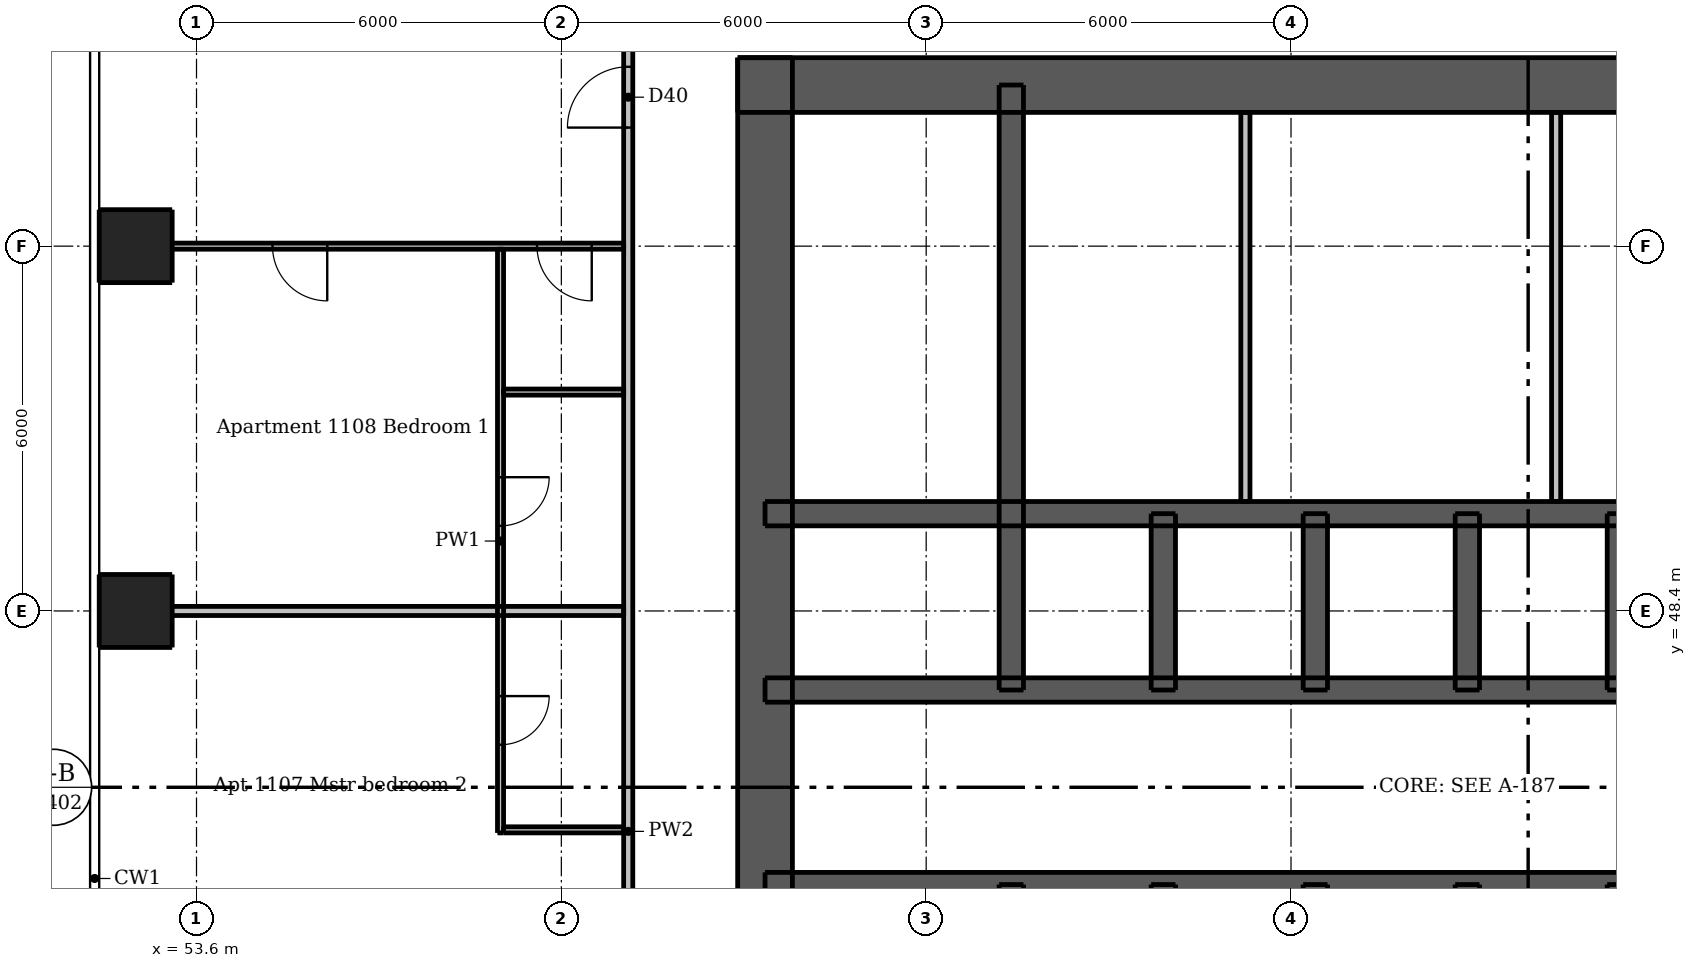
"""IFC4 building model, lengths in metres.
Left out: names, types, materials, properties, quantities, classifications, styles, units other than length and angle.
Written with IfcOpenShell. Run it as: python <this file> out.ifc"""

import sys

from ifc_helpers import new_model, si_unit, direction, frame, frame_2d, origin, origin_2d, place, context, subcontext, project, spatial, rectangle, extrude, element, fill, save


model = new_model("IFC4")
c1 = context("Model", 3, precision=1e-05, world=origin(), true_north=direction((0.0, 1.0)))
c2 = subcontext(c1, "Body", "Model", "MODEL_VIEW")
j1 = project(units=[si_unit("LENGTHUNIT", "METRE"), si_unit("PLANEANGLEUNIT", "RADIAN")], contexts=[c1])
p1 = place(None, origin())
s1 = spatial("IfcSite", under=j1, at=p1, CompositionType="ELEMENT")
p2 = place(p1, origin())
s2 = spatial("IfcBuilding", under=s1, at=p2, CompositionType="ELEMENT")
p3 = place(p2, frame((0.0, 0.0, 43.3)))
s3 = spatial("IfcBuildingStorey", under=s2, at=p3, CompositionType="ELEMENT", Elevation=43.3)
p4 = place(p3, frame((62.5, 57.05, 0.0), z_axis=(0.0, 0.0, 1.0), x_axis=(1.0, 0.0, 0.0)))
e1 = element("IfcWall", 1, at=p4, inside=s3, PredefinedType="SHEAR", context=c2, shape_type="SweptSolid", body=[
    extrude(rectangle(XDim=24.0, YDim=0.9, at=frame_2d((12.0, 0.0))), origin(), (0.0, 0.0, 1.0), 3.05),
])
p5 = place(p4, frame((20.85, 0.0, 0.0)))
e2 = element("IfcOpeningElement", 2, at=p5, cuts=e1, PredefinedType="OPENING", context=c2, shape_type="SweptSolid", body=[
    extrude(rectangle(XDim=1.1, YDim=2.1, at=frame_2d((0.55, 1.05))), frame((0.0, 0.46, 0.0), z_axis=(0.0, -1.0, 0.0), x_axis=(1.0, 0.0, 0.0)), (0.0, 0.0, 1.0), 0.92),
])
p6 = place(p4, frame((2.05, 0.0, 0.0)))
e3 = element("IfcOpeningElement", 3, at=p6, cuts=e1, PredefinedType="OPENING", context=c2, shape_type="SweptSolid", body=[
    extrude(rectangle(XDim=1.1, YDim=2.1, at=frame_2d((0.55, 1.05))), frame((0.0, 0.46, 0.0), z_axis=(0.0, -1.0, 0.0), x_axis=(1.0, 0.0, 0.0)), (0.0, 0.0, 1.0), 0.92),
])
p7 = place(p4, frame((6.075, 0.0, 0.0)))
e4 = element("IfcOpeningElement", 4, at=p7, cuts=e1, PredefinedType="OPENING", context=c2, shape_type="SweptSolid", body=[
    extrude(rectangle(XDim=0.9, YDim=2.1, at=frame_2d((0.45, 1.05))), frame((0.0, 0.46, 0.0), z_axis=(0.0, -1.0, 0.0), x_axis=(1.0, 0.0, 0.0)), (0.0, 0.0, 1.0), 0.92),
])
p8 = place(p4, frame((10.455, 0.0, 0.0)))
e5 = element("IfcOpeningElement", 5, at=p8, cuts=e1, PredefinedType="OPENING", context=c2, shape_type="SweptSolid", body=[
    extrude(rectangle(XDim=0.9, YDim=2.1, at=frame_2d((0.45, 1.05))), frame((0.0, 0.46, 0.0), z_axis=(0.0, -1.0, 0.0), x_axis=(1.0, 0.0, 0.0)), (0.0, 0.0, 1.0), 0.92),
])
p9 = place(p4, frame((15.93, 0.0, 0.0)))
e6 = element("IfcOpeningElement", 6, at=p9, cuts=e1, PredefinedType="OPENING", context=c2, shape_type="SweptSolid", body=[
    extrude(rectangle(XDim=0.9, YDim=2.1, at=frame_2d((0.45, 1.05))), frame((0.0, 0.46, 0.0), z_axis=(0.0, -1.0, 0.0), x_axis=(1.0, 0.0, 0.0)), (0.0, 0.0, 1.0), 0.92),
])
p10 = place(p3, frame((62.95, 33.5, 0.0), z_axis=(0.0, 0.0, 1.0), x_axis=(0.0, 1.0, 0.0)))
e7 = element("IfcWall", 7, at=p10, inside=s3, PredefinedType="SHEAR", context=c2, shape_type="SweptSolid", body=[
    extrude(rectangle(XDim=24.0, YDim=0.9, at=frame_2d((12.0, 0.0))), origin(), (0.0, 0.0, 1.0), 3.05),
])
p11 = place(p10, frame((11.2, 0.0, 0.0)))
e8 = element("IfcOpeningElement", 8, at=p11, cuts=e7, PredefinedType="OPENING", context=c2, shape_type="SweptSolid", body=[
    extrude(rectangle(XDim=1.6, YDim=2.1, at=frame_2d((0.8, 1.05))), frame((0.0, 0.46, 0.0), z_axis=(0.0, -1.0, 0.0), x_axis=(1.0, 0.0, 0.0)), (0.0, 0.0, 1.0), 0.92),
])
p12 = place(p3, frame((62.95, 43.9, 0.0), z_axis=(0.0, 0.0, 1.0), x_axis=(1.0, 0.0, 0.0)))
e9 = element("IfcWall", 9, at=p12, inside=s3, PredefinedType="SHEAR", context=c2, shape_type="SweptSolid", body=[
    extrude(rectangle(XDim=23.1, YDim=0.4, at=frame_2d((11.55, 0.0))), origin(), (0.0, 0.0, 1.0), 3.05),
])
p13 = place(p12, frame((1.088, 0.0, 0.0)))
e10 = element("IfcOpeningElement", 10, at=p13, cuts=e9, PredefinedType="OPENING", context=c2, shape_type="SweptSolid", body=[
    extrude(rectangle(XDim=0.9, YDim=2.1, at=frame_2d((0.45, 1.05))), frame((0.0, 0.21, 0.0), z_axis=(0.0, -1.0, 0.0), x_axis=(1.0, 0.0, 0.0)), (0.0, 0.0, 1.0), 0.42),
])
p14 = place(p12, frame((2.838, 0.0, 0.0)))
e11 = element("IfcOpeningElement", 11, at=p14, cuts=e9, PredefinedType="OPENING", context=c2, shape_type="SweptSolid", body=[
    extrude(rectangle(XDim=0.8, YDim=2.1, at=frame_2d((0.4, 1.05))), frame((0.0, 0.21, 0.0), z_axis=(0.0, -1.0, 0.0), x_axis=(1.0, 0.0, 0.0)), (0.0, 0.0, 1.0), 0.42),
])
p15 = place(p12, frame((20.5, 0.0, 0.0)))
e12 = element("IfcOpeningElement", 12, at=p15, cuts=e9, PredefinedType="OPENING", context=c2, shape_type="SweptSolid", body=[
    extrude(rectangle(XDim=0.9, YDim=2.1, at=frame_2d((0.45, 1.05))), frame((0.0, 0.21, 0.0), z_axis=(0.0, -1.0, 0.0), x_axis=(1.0, 0.0, 0.0)), (0.0, 0.0, 1.0), 0.42),
])
p16 = place(p12, frame((4.75, 0.0, 0.0)))
e13 = element("IfcOpeningElement", 13, at=p16, cuts=e9, PredefinedType="OPENING", context=c2, shape_type="SweptSolid", body=[
    extrude(rectangle(XDim=1.1, YDim=2.1, at=frame_2d((0.55, 1.05))), frame((0.0, 0.21, 0.0), z_axis=(0.0, -1.0, 0.0), x_axis=(1.0, 0.0, 0.0)), (0.0, 0.0, 1.0), 0.42),
])
p17 = place(p12, frame((7.25, 0.0, 0.0)))
e14 = element("IfcOpeningElement", 14, at=p17, cuts=e9, PredefinedType="OPENING", context=c2, shape_type="SweptSolid", body=[
    extrude(rectangle(XDim=1.1, YDim=2.1, at=frame_2d((0.55, 1.05))), frame((0.0, 0.21, 0.0), z_axis=(0.0, -1.0, 0.0), x_axis=(1.0, 0.0, 0.0)), (0.0, 0.0, 1.0), 0.42),
])
p18 = place(p12, frame((9.75, 0.0, 0.0)))
e15 = element("IfcOpeningElement", 15, at=p18, cuts=e9, PredefinedType="OPENING", context=c2, shape_type="SweptSolid", body=[
    extrude(rectangle(XDim=1.1, YDim=2.1, at=frame_2d((0.55, 1.05))), frame((0.0, 0.21, 0.0), z_axis=(0.0, -1.0, 0.0), x_axis=(1.0, 0.0, 0.0)), (0.0, 0.0, 1.0), 0.42),
])
p19 = place(p12, frame((12.25, 0.0, 0.0)))
e16 = element("IfcOpeningElement", 16, at=p19, cuts=e9, PredefinedType="OPENING", context=c2, shape_type="SweptSolid", body=[
    extrude(rectangle(XDim=1.1, YDim=2.1, at=frame_2d((0.55, 1.05))), frame((0.0, 0.21, 0.0), z_axis=(0.0, -1.0, 0.0), x_axis=(1.0, 0.0, 0.0)), (0.0, 0.0, 1.0), 0.42),
])
p20 = place(p12, frame((14.75, 0.0, 0.0)))
e17 = element("IfcOpeningElement", 17, at=p20, cuts=e9, PredefinedType="OPENING", context=c2, shape_type="SweptSolid", body=[
    extrude(rectangle(XDim=1.1, YDim=2.1, at=frame_2d((0.55, 1.05))), frame((0.0, 0.21, 0.0), z_axis=(0.0, -1.0, 0.0), x_axis=(1.0, 0.0, 0.0)), (0.0, 0.0, 1.0), 0.42),
])
p21 = place(p12, frame((17.25, 0.0, 0.0)))
e18 = element("IfcOpeningElement", 18, at=p21, cuts=e9, PredefinedType="OPENING", context=c2, shape_type="SweptSolid", body=[
    extrude(rectangle(XDim=1.1, YDim=2.1, at=frame_2d((0.55, 1.05))), frame((0.0, 0.21, 0.0), z_axis=(0.0, -1.0, 0.0), x_axis=(1.0, 0.0, 0.0)), (0.0, 0.0, 1.0), 0.42),
])
p22 = place(p3, frame((62.95, 47.1, 0.0), z_axis=(0.0, 0.0, 1.0), x_axis=(1.0, 0.0, 0.0)))
e19 = element("IfcWall", 19, at=p22, inside=s3, PredefinedType="SHEAR", context=c2, shape_type="SweptSolid", body=[
    extrude(rectangle(XDim=23.1, YDim=0.4, at=frame_2d((11.55, 0.0))), origin(), (0.0, 0.0, 1.0), 3.05),
])
p23 = place(p22, frame((1.7, 0.0, 0.0)))
e20 = element("IfcOpeningElement", 20, at=p23, cuts=e19, PredefinedType="OPENING", context=c2, shape_type="SweptSolid", body=[
    extrude(rectangle(XDim=0.9, YDim=2.1, at=frame_2d((0.45, 1.05))), frame((0.0, 0.21, 0.0), z_axis=(0.0, -1.0, 0.0), x_axis=(1.0, 0.0, 0.0)), (0.0, 0.0, 1.0), 0.42),
])
p24 = place(p22, frame((20.5, 0.0, 0.0)))
e21 = element("IfcOpeningElement", 21, at=p24, cuts=e19, PredefinedType="OPENING", context=c2, shape_type="SweptSolid", body=[
    extrude(rectangle(XDim=0.9, YDim=2.1, at=frame_2d((0.45, 1.05))), frame((0.0, 0.21, 0.0), z_axis=(0.0, -1.0, 0.0), x_axis=(1.0, 0.0, 0.0)), (0.0, 0.0, 1.0), 0.42),
])
p25 = place(p3, frame((62.95, 50.0, 0.0), z_axis=(0.0, 0.0, 1.0), x_axis=(1.0, 0.0, 0.0)))
e22 = element("IfcWall", 22, at=p25, inside=s3, PredefinedType="SHEAR", context=c2, shape_type="SweptSolid", body=[
    extrude(rectangle(XDim=23.1, YDim=0.4, at=frame_2d((11.55, 0.0))), origin(), (0.0, 0.0, 1.0), 3.05),
])
p26 = place(p3, frame((67.0, 33.95, 0.0), z_axis=(0.0, 0.0, 1.0), x_axis=(0.0, 1.0, 0.0)))
e23 = element("IfcWall", 23, at=p26, inside=s3, PredefinedType="SHEAR", context=c2, shape_type="SweptSolid", body=[
    extrude(rectangle(XDim=9.95, YDim=0.4, at=frame_2d((4.975, 0.0))), origin(), (0.0, 0.0, 1.0), 3.05),
])
p27 = place(p26, frame((0.65, 0.0, 0.0)))
e24 = element("IfcOpeningElement", 24, at=p27, cuts=e23, PredefinedType="OPENING", context=c2, shape_type="SweptSolid", body=[
    extrude(rectangle(XDim=1.1, YDim=2.1, at=frame_2d((0.55, 1.05))), frame((0.0, 0.21, 0.0), z_axis=(0.0, -1.0, 0.0), x_axis=(1.0, 0.0, 0.0)), (0.0, 0.0, 1.0), 0.42),
])
p28 = place(p3, frame((67.0, 47.1, 0.0), z_axis=(0.0, 0.0, 1.0), x_axis=(0.0, 1.0, 0.0)))
e25 = element("IfcWall", 25, at=p28, inside=s3, PredefinedType="SHEAR", context=c2, shape_type="SweptSolid", body=[
    extrude(rectangle(XDim=9.95, YDim=0.4, at=frame_2d((4.975, 0.0))), origin(), (0.0, 0.0, 1.0), 3.05),
])
for number, where, z_axis, x_axis in (
    (26, (69.5, 41.0, 0.0), (0.0, 0.0, 1.0), (0.0, 1.0, 0.0)),
    (27, (69.5, 47.1, 0.0), (0.0, 0.0, 1.0), (0.0, 1.0, 0.0)),
    (28, (72.0, 41.0, 0.0), (0.0, 0.0, 1.0), (0.0, 1.0, 0.0)),
    (29, (72.0, 47.1, 0.0), (0.0, 0.0, 1.0), (0.0, 1.0, 0.0)),
    (30, (74.5, 41.0, 0.0), (0.0, 0.0, 1.0), (0.0, 1.0, 0.0)),
    (31, (74.5, 47.1, 0.0), (0.0, 0.0, 1.0), (0.0, 1.0, 0.0)),
    (32, (77.0, 41.0, 0.0), (0.0, 0.0, 1.0), (0.0, 1.0, 0.0)),
    (33, (77.0, 47.1, 0.0), (0.0, 0.0, 1.0), (0.0, 1.0, 0.0)),
):
    element("IfcWall", number, at=place(p3, frame(where, z_axis=z_axis, x_axis=x_axis)), inside=s3, PredefinedType="SHEAR", context=c2, shape_type="SweptSolid", body=[
        extrude(rectangle(XDim=2.9, YDim=0.4, at=frame_2d((1.45, 0.0))), origin(), (0.0, 0.0, 1.0), 3.05),
    ])
for number, where, z_axis, x_axis in (
    (34, (52.6, 48.4, 0.0), (0.0, 0.0, 1.0), (1.0, 0.0, 0.0)),
    (35, (52.6, 54.4, 0.0), (0.0, 0.0, 1.0), (1.0, 0.0, 0.0)),
):
    element("IfcColumn", number, at=place(p3, frame(where, z_axis=z_axis, x_axis=x_axis)), inside=s3, PredefinedType="COLUMN", context=c2, shape_type="SweptSolid", body=[
        extrude(rectangle(XDim=1.2, YDim=1.2, at=origin_2d()), origin(), (0.0, 0.0, 1.0), 3.05),
    ])
for number, where, z_axis, x_axis in (
    (36, (70.85, 50.2, 0.0), (0.0, 0.0, 1.0), (0.0, 1.0, 0.0)),
    (37, (75.96, 50.2, 0.0), (0.0, 0.0, 1.0), (0.0, 1.0, 0.0)),
):
    element("IfcWall", number, at=place(p3, frame(where, z_axis=z_axis, x_axis=x_axis)), inside=s3, PredefinedType="PLUMBINGWALL", context=c2, shape_type="SweptSolid", body=[
        extrude(rectangle(XDim=6.4, YDim=0.15, at=frame_2d((3.2, 0.0))), origin(), (0.0, 0.0, 1.0), 3.05),
    ])
p29 = place(p3, frame((58.6, 54.35, 0.0), z_axis=(0.0, 0.0, 1.0), x_axis=(0.0, -1.0, 0.0)))
e38 = element("IfcWall", 38, at=p29, inside=s3, PredefinedType="PARTITIONING", context=c2, shape_type="SweptSolid", body=[
    extrude(rectangle(XDim=9.6, YDim=0.1, at=frame_2d((4.8, 0.0))), origin(), (0.0, 0.0, 1.0), 3.05),
])
p30 = place(p29, frame((7.35, 0.0, 0.0)))
e39 = element("IfcOpeningElement", 39, at=p30, cuts=e38, PredefinedType="OPENING", context=c2, shape_type="SweptSolid", body=[
    extrude(rectangle(XDim=0.8, YDim=2.1, at=frame_2d((0.4, 1.05))), frame((0.0, 0.06, 0.0), z_axis=(0.0, -1.0, 0.0), x_axis=(1.0, 0.0, 0.0)), (0.0, 0.0, 1.0), 0.12),
])
p31 = place(p29, frame((3.75, 0.0, 0.0)))
e40 = element("IfcOpeningElement", 40, at=p31, cuts=e38, PredefinedType="OPENING", context=c2, shape_type="SweptSolid", body=[
    extrude(rectangle(XDim=0.8, YDim=2.1, at=frame_2d((0.4, 1.05))), frame((0.0, 0.06, 0.0), z_axis=(0.0, -1.0, 0.0), x_axis=(1.0, 0.0, 0.0)), (0.0, 0.0, 1.0), 0.12),
])
p32 = place(p3, frame((60.625, 54.4, 0.0), z_axis=(0.0, 0.0, 1.0), x_axis=(-1.0, 0.0, 0.0)))
e41 = element("IfcWall", 41, at=p32, inside=s3, PredefinedType="PARTITIONING", context=c2, shape_type="SweptSolid", body=[
    extrude(rectangle(XDim=8.625, YDim=0.1, at=frame_2d((4.312, 0.0))), origin(), (0.0, 0.0, 1.0), 2.516),
])
p33 = place(p32, frame((0.525, 0.0, 0.0)))
e42 = element("IfcOpeningElement", 42, at=p33, cuts=e41, PredefinedType="OPENING", context=c2, shape_type="SweptSolid", body=[
    extrude(rectangle(XDim=0.9, YDim=2.1, at=frame_2d((0.45, 1.05))), frame((0.0, 0.06, 0.0), z_axis=(0.0, -1.0, 0.0), x_axis=(1.0, 0.0, 0.0)), (0.0, 0.0, 1.0), 0.12),
])
p34 = place(p32, frame((4.875, 0.0, 0.0)))
e43 = element("IfcOpeningElement", 43, at=p34, cuts=e41, PredefinedType="OPENING", context=c2, shape_type="SweptSolid", body=[
    extrude(rectangle(XDim=0.9, YDim=2.1, at=frame_2d((0.45, 1.05))), frame((0.0, 0.06, 0.0), z_axis=(0.0, -1.0, 0.0), x_axis=(1.0, 0.0, 0.0)), (0.0, 0.0, 1.0), 0.12),
])
for number, where, z_axis, x_axis in (
    (44, (58.65, 52.0, 0.0), (0.0, 0.0, 1.0), (1.0, 0.0, 0.0)),
    (45, (58.65, 44.8, 0.0), (0.0, 0.0, 1.0), (1.0, 0.0, 0.0)),
):
    element("IfcWall", number, at=place(p3, frame(where, z_axis=z_axis, x_axis=x_axis)), inside=s3, PredefinedType="PARTITIONING", context=c2, shape_type="SweptSolid", body=[
        extrude(rectangle(XDim=1.975, YDim=0.1, at=frame_2d((0.988, 0.0))), origin(), (0.0, 0.0, 1.0), 3.05),
    ])
p35 = place(p3, frame((60.7, 30.325, 0.0), z_axis=(0.0, 0.0, 1.0), x_axis=(0.0, 1.0, 0.0)))
e46 = element("IfcWall", 46, at=p35, inside=s3, PredefinedType="PARTITIONING", context=c2, shape_type="SweptSolid", body=[
    extrude(rectangle(XDim=28.9, YDim=0.15, at=frame_2d((14.45, 0.0))), origin(), (0.0, 0.0, 1.0), 3.05),
])
p36 = place(p35, frame((7.375, 0.0, 0.0)))
e47 = element("IfcOpeningElement", 47, at=p36, cuts=e46, PredefinedType="OPENING", context=c2, shape_type="SweptSolid", body=[
    extrude(rectangle(XDim=1.0, YDim=2.1, at=frame_2d((0.5, 1.05))), frame((0.0, 0.085, 0.0), z_axis=(0.0, -1.0, 0.0), x_axis=(1.0, 0.0, 0.0)), (0.0, 0.0, 1.0), 0.17),
])
p37 = place(p35, frame((26.025, 0.0, 0.0)))
e48 = element("IfcOpeningElement", 48, at=p37, cuts=e46, PredefinedType="OPENING", context=c2, shape_type="SweptSolid", body=[
    extrude(rectangle(XDim=1.0, YDim=2.1, at=frame_2d((0.5, 1.05))), frame((0.0, 0.085, 0.0), z_axis=(0.0, -1.0, 0.0), x_axis=(1.0, 0.0, 0.0)), (0.0, 0.0, 1.0), 0.17),
])
p38 = place(p3, frame((52.0, 48.4, 0.0), z_axis=(0.0, 0.0, 1.0), x_axis=(1.0, 0.0, 0.0)))
e49 = element("IfcWall", 49, at=p38, inside=s3, PredefinedType="PARTITIONING", context=c2, shape_type="SweptSolid", body=[
    extrude(rectangle(XDim=8.625, YDim=0.15, at=frame_2d((4.312, 0.0))), origin(), (0.0, 0.0, 1.0), 2.516),
])
p39 = place(p6, origin())
e50 = element("IfcDoor", 50, at=p39, inside=s3, OperationType="SINGLE_SWING_LEFT", PredefinedType="DOOR", context=c2, shape_type="SweptSolid", body=[
    extrude(rectangle(XDim=1.1, YDim=2.1, at=frame_2d((0.55, 1.05))), frame((0.0, -0.388, 0.0), z_axis=(0.0, -1.0, 0.0), x_axis=(1.0, 0.0, 0.0)), (0.0, 0.0, 1.0), 0.05),
])
fill(e3, e50)
p40 = place(p11, origin())
e51 = element("IfcDoor", 51, at=p40, inside=s3, OperationType="DOUBLE_DOOR_SINGLE_SWING", PredefinedType="DOOR", context=c2, shape_type="SweptSolid", body=[
    extrude(rectangle(XDim=1.6, YDim=2.1, at=frame_2d((0.8, 1.05))), frame((0.0, -0.388, 0.0), z_axis=(0.0, -1.0, 0.0), x_axis=(1.0, 0.0, 0.0)), (0.0, 0.0, 1.0), 0.05),
])
fill(e8, e51)
p41 = place(p23, origin())
e52 = element("IfcDoor", 52, at=p41, inside=s3, OperationType="SINGLE_SWING_LEFT", PredefinedType="DOOR", context=c2, shape_type="SweptSolid", body=[
    extrude(rectangle(XDim=0.9, YDim=2.1, at=frame_2d((0.45, 1.05))), frame((0.0, 0.188, 0.0), z_axis=(0.0, -1.0, 0.0), x_axis=(1.0, 0.0, 0.0)), (0.0, 0.0, 1.0), 0.05),
])
fill(e20, e52)
p42 = place(p7, origin())
e53 = element("IfcDoor", 53, at=p42, inside=s3, OperationType="SINGLE_SWING_RIGHT", PredefinedType="DOOR", context=c2, shape_type="SweptSolid", body=[
    extrude(rectangle(XDim=0.9, YDim=2.1, at=frame_2d((0.45, 1.05))), frame((0.0, -0.388, 0.0), z_axis=(0.0, -1.0, 0.0), x_axis=(1.0, 0.0, 0.0)), (0.0, 0.0, 1.0), 0.05),
])
fill(e4, e53)
p43 = place(p8, origin())
e54 = element("IfcDoor", 54, at=p43, inside=s3, OperationType="SINGLE_SWING_RIGHT", PredefinedType="DOOR", context=c2, shape_type="SweptSolid", body=[
    extrude(rectangle(XDim=0.9, YDim=2.1, at=frame_2d((0.45, 1.05))), frame((0.0, -0.388, 0.0), z_axis=(0.0, -1.0, 0.0), x_axis=(1.0, 0.0, 0.0)), (0.0, 0.0, 1.0), 0.05),
])
fill(e5, e54)
p44 = place(p16, origin())
e55 = element("IfcDoor", 55, at=p44, inside=s3, OperationType="DOUBLE_DOOR_SLIDING", PredefinedType="DOOR", context=c2, shape_type="SweptSolid", body=[
    extrude(rectangle(XDim=1.1, YDim=2.1, at=frame_2d((0.55, 1.05))), frame((0.0, 0.025, 0.0), z_axis=(0.0, -1.0, 0.0), x_axis=(1.0, 0.0, 0.0)), (0.0, 0.0, 1.0), 0.05),
])
fill(e13, e55)
p45 = place(p17, origin())
e56 = element("IfcDoor", 56, at=p45, inside=s3, OperationType="DOUBLE_DOOR_SLIDING", PredefinedType="DOOR", context=c2, shape_type="SweptSolid", body=[
    extrude(rectangle(XDim=1.1, YDim=2.1, at=frame_2d((0.55, 1.05))), frame((0.0, 0.025, 0.0), z_axis=(0.0, -1.0, 0.0), x_axis=(1.0, 0.0, 0.0)), (0.0, 0.0, 1.0), 0.05),
])
fill(e14, e56)
p46 = place(p18, origin())
e57 = element("IfcDoor", 57, at=p46, inside=s3, OperationType="DOUBLE_DOOR_SLIDING", PredefinedType="DOOR", context=c2, shape_type="SweptSolid", body=[
    extrude(rectangle(XDim=1.1, YDim=2.1, at=frame_2d((0.55, 1.05))), frame((0.0, 0.025, 0.0), z_axis=(0.0, -1.0, 0.0), x_axis=(1.0, 0.0, 0.0)), (0.0, 0.0, 1.0), 0.05),
])
fill(e15, e57)
p47 = place(p19, origin())
e58 = element("IfcDoor", 58, at=p47, inside=s3, OperationType="DOUBLE_DOOR_SLIDING", PredefinedType="DOOR", context=c2, shape_type="SweptSolid", body=[
    extrude(rectangle(XDim=1.1, YDim=2.1, at=frame_2d((0.55, 1.05))), frame((0.0, 0.025, 0.0), z_axis=(0.0, -1.0, 0.0), x_axis=(1.0, 0.0, 0.0)), (0.0, 0.0, 1.0), 0.05),
])
fill(e16, e58)
p48 = place(p30, origin())
e59 = element("IfcDoor", 59, at=p48, inside=s3, OperationType="SINGLE_SWING_LEFT", PredefinedType="DOOR", context=c2, shape_type="SweptSolid", body=[
    extrude(rectangle(XDim=0.8, YDim=2.1, at=frame_2d((0.4, 1.05))), frame((0.0, 0.025, 0.0), z_axis=(0.0, -1.0, 0.0), x_axis=(1.0, 0.0, 0.0)), (0.0, 0.0, 1.0), 0.05),
])
fill(e39, e59)
p49 = place(p37, origin())
e60 = element("IfcDoor", 60, at=p49, inside=s3, OperationType="SINGLE_SWING_LEFT", PredefinedType="DOOR", context=c2, shape_type="SweptSolid", body=[
    extrude(rectangle(XDim=1.0, YDim=2.1, at=frame_2d((0.5, 1.05))), frame((0.0, 0.025, 0.0), z_axis=(0.0, -1.0, 0.0), x_axis=(1.0, 0.0, 0.0)), (0.0, 0.0, 1.0), 0.05),
])
fill(e48, e60)
p50 = place(p33, origin())
e61 = element("IfcDoor", 61, at=p50, inside=s3, OperationType="SINGLE_SWING_LEFT", PredefinedType="DOOR", context=c2, shape_type="SweptSolid", body=[
    extrude(rectangle(XDim=0.9, YDim=2.1, at=frame_2d((0.45, 1.05))), frame((0.0, 0.025, 0.0), z_axis=(0.0, -1.0, 0.0), x_axis=(1.0, 0.0, 0.0)), (0.0, 0.0, 1.0), 0.05),
])
fill(e42, e61)
p51 = place(p34, origin())
e62 = element("IfcDoor", 62, at=p51, inside=s3, OperationType="SINGLE_SWING_LEFT", PredefinedType="DOOR", context=c2, shape_type="SweptSolid", body=[
    extrude(rectangle(XDim=0.9, YDim=2.1, at=frame_2d((0.45, 1.05))), frame((0.0, 0.025, 0.0), z_axis=(0.0, -1.0, 0.0), x_axis=(1.0, 0.0, 0.0)), (0.0, 0.0, 1.0), 0.05),
])
fill(e43, e62)
p52 = place(p31, origin())
e63 = element("IfcDoor", 63, at=p52, inside=s3, OperationType="SINGLE_SWING_LEFT", PredefinedType="DOOR", context=c2, shape_type="SweptSolid", body=[
    extrude(rectangle(XDim=0.8, YDim=2.1, at=frame_2d((0.4, 1.05))), frame((0.0, 0.025, 0.0), z_axis=(0.0, -1.0, 0.0), x_axis=(1.0, 0.0, 0.0)), (0.0, 0.0, 1.0), 0.05),
])
fill(e40, e63)
save(model, sys.argv[1])
